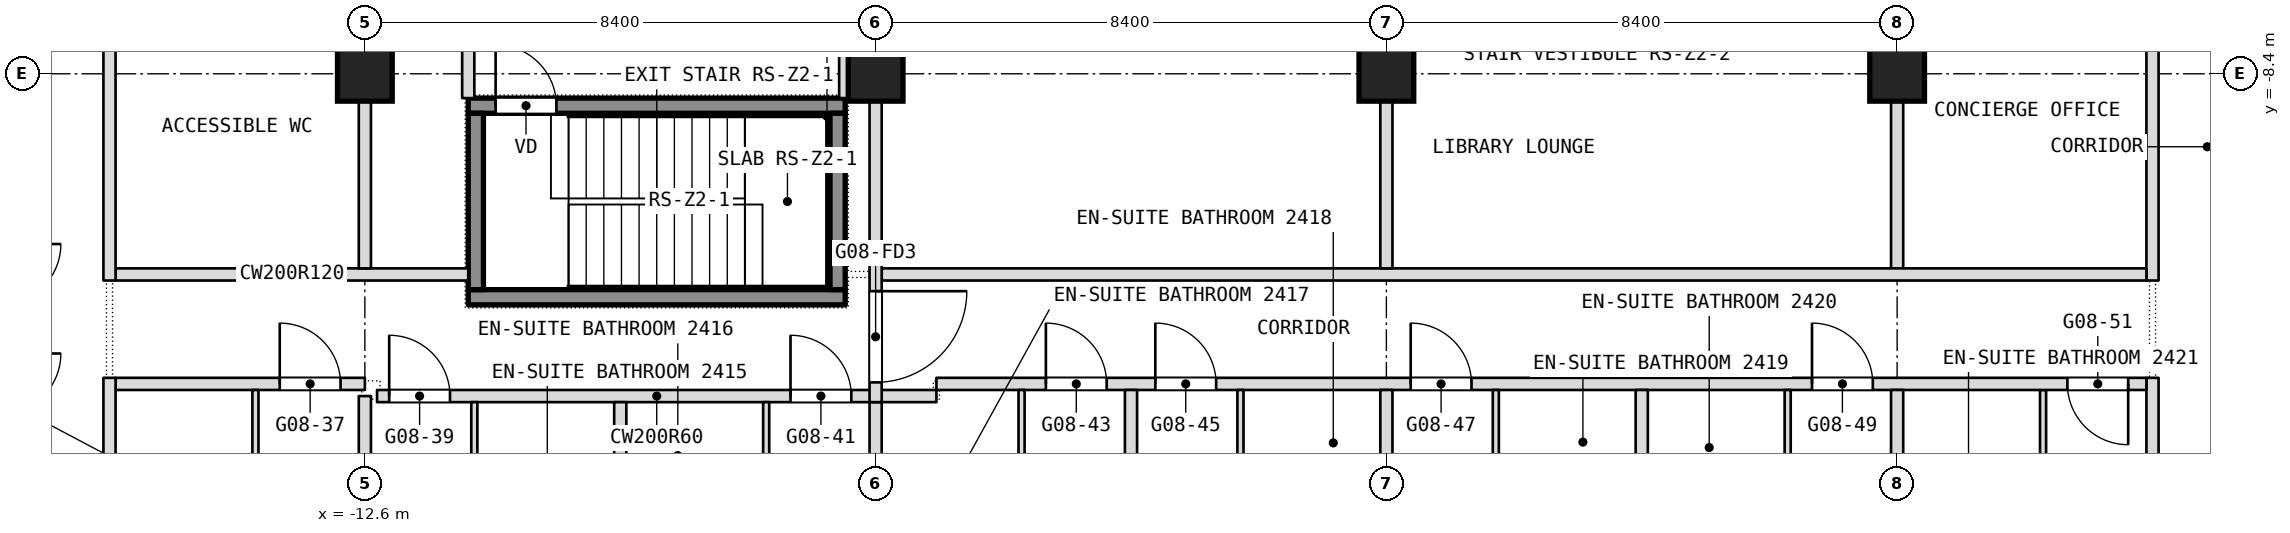
"""IFC4 building model, lengths in metres.
Left out: names, types, materials, properties, quantities, classifications, styles, units other than length and angle.
Written with IfcOpenShell. Run it as: python <this file> out.ifc"""

import sys

from ifc_helpers import new_model, si_unit, direction, frame, frame_2d, origin, origin_2d, place, context, subcontext, project, spatial, rectangle, extrude, element, fill, save


model = new_model("IFC4")
c1 = context("Model", 3, precision=1e-05, world=origin(), true_north=direction((0.0, 1.0)))
c2 = subcontext(c1, "Body", "Model", "MODEL_VIEW")
j1 = project(units=[si_unit("LENGTHUNIT", "METRE"), si_unit("PLANEANGLEUNIT", "RADIAN")], contexts=[c1])
p1 = place(None, origin())
s1 = spatial("IfcSite", under=j1, at=p1, CompositionType="ELEMENT")
p2 = place(p1, origin())
s2 = spatial("IfcBuilding", under=s1, at=p2, CompositionType="ELEMENT")
p3 = place(p2, frame((0.0, 0.0, 112.1)))
s3 = spatial("IfcBuildingStorey", under=s2, at=p3, CompositionType="ELEMENT", Elevation=112.1)
for number, where, z_axis, x_axis in (
    (1, (-12.6, -8.4, 0.0), (0.0, 0.0, 1.0), (1.0, 0.0, 0.0)),
    (2, (-4.2, -8.4, 0.0), (0.0, 0.0, 1.0), (1.0, 0.0, 0.0)),
    (3, (4.2, -8.4, 0.0), (0.0, 0.0, 1.0), (1.0, 0.0, 0.0)),
    (4, (12.6, -8.4, 0.0), (0.0, 0.0, 1.0), (1.0, 0.0, 0.0)),
):
    element("IfcColumn", number, at=place(p3, frame(where, z_axis=z_axis, x_axis=x_axis)), inside=s3, PredefinedType="COLUMN", context=c2, shape_type="SweptSolid", body=[
        extrude(rectangle(XDim=0.9, YDim=0.9, at=origin_2d()), origin(), (0.0, 0.0, 1.0), 3.6),
    ])
p4 = place(p3, frame((16.8, -22.186, 0.0), z_axis=(0.0, 0.0, 1.0), x_axis=(0.0, 1.0, 0.0)))
e5 = element("IfcWall", 5, at=p4, inside=s3, PredefinedType="PARTITIONING", context=c2, shape_type="SweptSolid", body=[
    extrude(rectangle(XDim=8.786, YDim=0.2, at=frame_2d((4.393, 0.0))), origin(), (0.0, 0.0, 1.0), 3.34),
])
p5 = place(p3, frame((16.8, -11.8, 0.0), z_axis=(0.0, 0.0, 1.0), x_axis=(0.0, 1.0, 0.0)))
e6 = element("IfcWall", 6, at=p5, inside=s3, PredefinedType="PARTITIONING", context=c2, shape_type="SweptSolid", body=[
    extrude(rectangle(XDim=9.9, YDim=0.2, at=frame_2d((4.95, 0.0))), origin(), (0.0, 0.0, 1.0), 3.34),
])
p6 = place(p3, frame((15.0, -16.85, 0.0), z_axis=(0.0, 0.0, 1.0), x_axis=(0.0, 1.0, 0.0)))
e7 = element("IfcWall", 7, at=p6, inside=s3, PredefinedType="PARTITIONING", context=c2, shape_type="SweptSolid", body=[
    extrude(rectangle(XDim=3.25, YDim=0.1, at=frame_2d((1.625, 0.0))), origin(), (0.0, 0.0, 1.0), 3.34),
])
p7 = place(p3, frame((-12.4, -13.7, 0.0), z_axis=(0.0, 0.0, 1.0), x_axis=(1.0, 0.0, 0.0)))
e8 = element("IfcWall", 8, at=p7, inside=s3, PredefinedType="PARTITIONING", context=c2, shape_type="SweptSolid", body=[
    extrude(rectangle(XDim=9.2, YDim=0.2, at=frame_2d((4.6, 0.0))), origin(), (0.0, 0.0, 1.0), 3.34),
])
p8 = place(p7, frame((0.2, 0.0, 0.0)))
e9 = element("IfcOpeningElement", 9, at=p8, cuts=e8, PredefinedType="OPENING", context=c2, shape_type="SweptSolid", body=[
    extrude(rectangle(XDim=1.0, YDim=2.1, at=frame_2d((0.5, 1.05))), frame((0.0, 0.1, 0.0), z_axis=(0.0, -1.0, 0.0), x_axis=(1.0, 0.0, 0.0)), (0.0, 0.0, 1.0), 0.2),
])
p9 = place(p7, frame((6.8, 0.0, 0.0)))
e10 = element("IfcOpeningElement", 10, at=p9, cuts=e8, PredefinedType="OPENING", context=c2, shape_type="SweptSolid", body=[
    extrude(rectangle(XDim=1.0, YDim=2.1, at=frame_2d((0.5, 1.05))), frame((0.0, 0.1, 0.0), z_axis=(0.0, -1.0, 0.0), x_axis=(1.0, 0.0, 0.0)), (0.0, 0.0, 1.0), 0.2),
])
p10 = place(p3, frame((-16.7, -13.5, 0.0), z_axis=(0.0, 0.0, 1.0), x_axis=(1.0, 0.0, 0.0)))
e11 = element("IfcWall", 11, at=p10, inside=s3, PredefinedType="PARTITIONING", context=c2, shape_type="SweptSolid", body=[
    extrude(rectangle(XDim=4.1, YDim=0.2, at=frame_2d((2.05, 0.0))), origin(), (0.0, 0.0, 1.0), 3.34),
])
p11 = place(p10, frame((2.7, 0.0, 0.0)))
e12 = element("IfcOpeningElement", 12, at=p11, cuts=e11, PredefinedType="OPENING", context=c2, shape_type="SweptSolid", body=[
    extrude(rectangle(XDim=1.0, YDim=2.1, at=frame_2d((0.5, 1.05))), frame((0.0, 0.1, 0.0), z_axis=(0.0, -1.0, 0.0), x_axis=(1.0, 0.0, 0.0)), (0.0, 0.0, 1.0), 0.2),
])
p12 = place(p3, frame((-3.2, -13.5, 0.0), z_axis=(0.0, 0.0, 1.0), x_axis=(1.0, 0.0, 0.0)))
e13 = element("IfcWall", 13, at=p12, inside=s3, PredefinedType="PARTITIONING", context=c2, shape_type="SweptSolid", body=[
    extrude(rectangle(XDim=19.9, YDim=0.2, at=frame_2d((9.95, 0.0))), origin(), (0.0, 0.0, 1.0), 3.34),
])
p13 = place(p12, frame((1.8, 0.0, 0.0)))
e14 = element("IfcOpeningElement", 14, at=p13, cuts=e13, PredefinedType="OPENING", context=c2, shape_type="SweptSolid", body=[
    extrude(rectangle(XDim=1.0, YDim=2.1, at=frame_2d((0.5, 1.05))), frame((0.0, 0.1, 0.0), z_axis=(0.0, -1.0, 0.0), x_axis=(1.0, 0.0, 0.0)), (0.0, 0.0, 1.0), 0.2),
])
p14 = place(p12, frame((3.6, 0.0, 0.0)))
e15 = element("IfcOpeningElement", 15, at=p14, cuts=e13, PredefinedType="OPENING", context=c2, shape_type="SweptSolid", body=[
    extrude(rectangle(XDim=1.0, YDim=2.1, at=frame_2d((0.5, 1.05))), frame((0.0, 0.1, 0.0), z_axis=(0.0, -1.0, 0.0), x_axis=(1.0, 0.0, 0.0)), (0.0, 0.0, 1.0), 0.2),
])
p15 = place(p12, frame((7.8, 0.0, 0.0)))
e16 = element("IfcOpeningElement", 16, at=p15, cuts=e13, PredefinedType="OPENING", context=c2, shape_type="SweptSolid", body=[
    extrude(rectangle(XDim=1.0, YDim=2.1, at=frame_2d((0.5, 1.05))), frame((0.0, 0.1, 0.0), z_axis=(0.0, -1.0, 0.0), x_axis=(1.0, 0.0, 0.0)), (0.0, 0.0, 1.0), 0.2),
])
p16 = place(p12, frame((14.4, 0.0, 0.0)))
e17 = element("IfcOpeningElement", 17, at=p16, cuts=e13, PredefinedType="OPENING", context=c2, shape_type="SweptSolid", body=[
    extrude(rectangle(XDim=1.0, YDim=2.1, at=frame_2d((0.5, 1.05))), frame((0.0, 0.1, 0.0), z_axis=(0.0, -1.0, 0.0), x_axis=(1.0, 0.0, 0.0)), (0.0, 0.0, 1.0), 0.2),
])
p17 = place(p12, frame((18.6, 0.0, 0.0)))
e18 = element("IfcOpeningElement", 18, at=p17, cuts=e13, PredefinedType="OPENING", context=c2, shape_type="SweptSolid", body=[
    extrude(rectangle(XDim=1.0, YDim=2.1, at=frame_2d((0.5, 1.05))), frame((0.0, 0.1, 0.0), z_axis=(0.0, -1.0, 0.0), x_axis=(1.0, 0.0, 0.0)), (0.0, 0.0, 1.0), 0.2),
])
p18 = place(p3, frame((12.6, -21.175, 0.0), z_axis=(0.0, 0.0, 1.0), x_axis=(0.0, 1.0, 0.0)))
e19 = element("IfcWall", 19, at=p18, inside=s3, PredefinedType="PARTITIONING", context=c2, shape_type="SweptSolid", body=[
    extrude(rectangle(XDim=7.575, YDim=0.2, at=frame_2d((3.788, 0.0))), origin(), (0.0, 0.0, 1.0), 3.34),
])
p19 = place(p3, frame((12.6, -11.6, 0.0), z_axis=(0.0, 0.0, 1.0), x_axis=(0.0, 1.0, 0.0)))
e20 = element("IfcWall", 20, at=p19, inside=s3, PredefinedType="PARTITIONING", context=c2, shape_type="SweptSolid", body=[
    extrude(rectangle(XDim=3.9, YDim=0.2, at=frame_2d((1.95, 0.0))), origin(), (0.0, 0.0, 1.0), 3.34),
])
p20 = place(p3, frame((-16.7, -11.7, 0.0), z_axis=(0.0, 0.0, 1.0), x_axis=(1.0, 0.0, 0.0)))
e21 = element("IfcWall", 21, at=p20, inside=s3, PredefinedType="PARTITIONING", context=c2, shape_type="SweptSolid", body=[
    extrude(rectangle(XDim=5.8, YDim=0.2, at=frame_2d((2.9, 0.0))), origin(), (0.0, 0.0, 1.0), 3.34),
])
p21 = place(p3, frame((-4.1, -11.7, 0.0), z_axis=(0.0, 0.0, 1.0), x_axis=(1.0, 0.0, 0.0)))
e22 = element("IfcWall", 22, at=p21, inside=s3, PredefinedType="PARTITIONING", context=c2, shape_type="SweptSolid", body=[
    extrude(rectangle(XDim=20.8, YDim=0.2, at=frame_2d((10.4, 0.0))), origin(), (0.0, 0.0, 1.0), 3.34),
])
p22 = place(p3, frame((10.8, -16.45, 0.0), z_axis=(0.0, 0.0, 1.0), x_axis=(0.0, 1.0, 0.0)))
e23 = element("IfcWall", 23, at=p22, inside=s3, PredefinedType="PARTITIONING", context=c2, shape_type="SweptSolid", body=[
    extrude(rectangle(XDim=2.85, YDim=0.1, at=frame_2d((1.425, 0.0))), origin(), (0.0, 0.0, 1.0), 3.34),
])
p23 = place(p3, frame((8.4, -23.3, 0.0), z_axis=(0.0, 0.0, 1.0), x_axis=(0.0, 1.0, 0.0)))
e24 = element("IfcWall", 24, at=p23, inside=s3, PredefinedType="PARTITIONING", context=c2, shape_type="SweptSolid", body=[
    extrude(rectangle(XDim=9.7, YDim=0.2, at=frame_2d((4.85, 0.0))), origin(), (0.0, 0.0, 1.0), 3.34),
])
p24 = place(p3, frame((6.0, -16.35, 0.0), z_axis=(0.0, 0.0, 1.0), x_axis=(0.0, 1.0, 0.0)))
e25 = element("IfcWall", 25, at=p24, inside=s3, PredefinedType="PARTITIONING", context=c2, shape_type="SweptSolid", body=[
    extrude(rectangle(XDim=2.75, YDim=0.1, at=frame_2d((1.375, 0.0))), origin(), (0.0, 0.0, 1.0), 3.34),
])
p25 = place(p3, frame((4.2, -23.3, 0.0), z_axis=(0.0, 0.0, 1.0), x_axis=(0.0, 1.0, 0.0)))
e26 = element("IfcWall", 26, at=p25, inside=s3, PredefinedType="PARTITIONING", context=c2, shape_type="SweptSolid", body=[
    extrude(rectangle(XDim=9.7, YDim=0.2, at=frame_2d((4.85, 0.0))), origin(), (0.0, 0.0, 1.0), 3.34),
])
p26 = place(p3, frame((4.2, -11.6, 0.0), z_axis=(0.0, 0.0, 1.0), x_axis=(0.0, 1.0, 0.0)))
e27 = element("IfcWall", 27, at=p26, inside=s3, PredefinedType="PARTITIONING", context=c2, shape_type="SweptSolid", body=[
    extrude(rectangle(XDim=9.7, YDim=0.2, at=frame_2d((4.85, 0.0))), origin(), (0.0, 0.0, 1.0), 3.34),
])
p27 = place(p3, frame((1.8, -17.45, 0.0), z_axis=(0.0, 0.0, 1.0), x_axis=(0.0, 1.0, 0.0)))
e28 = element("IfcWall", 28, at=p27, inside=s3, PredefinedType="PARTITIONING", context=c2, shape_type="SweptSolid", body=[
    extrude(rectangle(XDim=3.85, YDim=0.1, at=frame_2d((1.925, 0.0))), origin(), (0.0, 0.0, 1.0), 3.34),
])
p28 = place(p27, frame((1.355, 0.0, 0.0)))
e29 = element("IfcOpeningElement", 29, at=p28, cuts=e28, PredefinedType="OPENING", context=c2, shape_type="SweptSolid", body=[
    extrude(rectangle(XDim=0.9, YDim=2.1, at=frame_2d((0.45, 1.05))), frame((0.0, 0.05, 0.0), z_axis=(0.0, -1.0, 0.0), x_axis=(1.0, 0.0, 0.0)), (0.0, 0.0, 1.0), 0.1),
])
p29 = place(p3, frame((0.0, -23.3, 0.0), z_axis=(0.0, 0.0, 1.0), x_axis=(0.0, 1.0, 0.0)))
e30 = element("IfcWall", 30, at=p29, inside=s3, PredefinedType="PARTITIONING", context=c2, shape_type="SweptSolid", body=[
    extrude(rectangle(XDim=9.7, YDim=0.2, at=frame_2d((4.85, 0.0))), origin(), (0.0, 0.0, 1.0), 3.34),
])
p30 = place(p3, frame((-1.8, -17.35, 0.0), z_axis=(0.0, 0.0, 1.0), x_axis=(0.0, 1.0, 0.0)))
e31 = element("IfcWall", 31, at=p30, inside=s3, PredefinedType="PARTITIONING", context=c2, shape_type="SweptSolid", body=[
    extrude(rectangle(XDim=3.75, YDim=0.1, at=frame_2d((1.875, 0.0))), origin(), (0.0, 0.0, 1.0), 3.34),
])
p31 = place(p3, frame((-4.2, -23.3, 0.0), z_axis=(0.0, 0.0, 1.0), x_axis=(0.0, 1.0, 0.0)))
e32 = element("IfcWall", 32, at=p31, inside=s3, PredefinedType="PARTITIONING", context=c2, shape_type="SweptSolid", body=[
    extrude(rectangle(XDim=9.5, YDim=0.2, at=frame_2d((4.75, 0.0))), origin(), (0.0, 0.0, 1.0), 3.34),
])
p32 = place(p3, frame((-4.2, -13.8, 0.0), z_axis=(0.0, 0.0, 1.0), x_axis=(0.0, 1.0, 0.0)))
e33 = element("IfcWall", 33, at=p32, inside=s3, PredefinedType="PARTITIONING", context=c2, shape_type="SweptSolid", body=[
    extrude(rectangle(XDim=13.8, YDim=0.2, at=frame_2d((6.9, 0.0))), origin(), (0.0, 0.0, 1.0), 3.34),
])
p33 = place(p32, frame((12.15, 0.0, 0.0)))
e34 = element("IfcOpeningElement", 34, at=p33, cuts=e33, PredefinedType="OPENING", context=c2, shape_type="SweptSolid", body=[
    extrude(rectangle(XDim=1.5, YDim=2.1, at=frame_2d((0.75, 1.05))), frame((0.0, 0.1, 0.0), z_axis=(0.0, -1.0, 0.0), x_axis=(1.0, 0.0, 0.0)), (0.0, 0.0, 1.0), 0.2),
])
p34 = place(p32, frame((0.325, 0.0, 0.0)))
e35 = element("IfcOpeningElement", 35, at=p34, cuts=e33, PredefinedType="OPENING", context=c2, shape_type="SweptSolid", body=[
    extrude(rectangle(XDim=1.5, YDim=2.1, at=frame_2d((0.75, 1.05))), frame((0.0, 0.1, 0.0), z_axis=(0.0, -1.0, 0.0), x_axis=(1.0, 0.0, 0.0)), (0.0, 0.0, 1.0), 0.2),
])
p35 = place(p3, frame((-4.7, -8.8, 0.0), z_axis=(0.0, 0.0, 1.0), x_axis=(0.0, 1.0, 0.0)))
e36 = element("IfcWall", 36, at=p35, inside=s3, PredefinedType="PARTITIONING", context=c2, shape_type="SweptSolid", body=[
    extrude(rectangle(XDim=1.7, YDim=0.2, at=frame_2d((0.85, 0.0))), origin(), (0.0, 0.0, 1.0), 3.34),
])
p36 = place(p3, frame((-6.0, -16.45, 0.0), z_axis=(0.0, 0.0, 1.0), x_axis=(0.0, 1.0, 0.0)))
e37 = element("IfcWall", 37, at=p36, inside=s3, PredefinedType="PARTITIONING", context=c2, shape_type="SweptSolid", body=[
    extrude(rectangle(XDim=2.65, YDim=0.1, at=frame_2d((1.325, 0.0))), origin(), (0.0, 0.0, 1.0), 3.34),
])
p37 = place(p3, frame((-8.4, -23.3, 0.0), z_axis=(0.0, 0.0, 1.0), x_axis=(0.0, 1.0, 0.0)))
e38 = element("IfcWall", 38, at=p37, inside=s3, PredefinedType="PARTITIONING", context=c2, shape_type="SweptSolid", body=[
    extrude(rectangle(XDim=9.5, YDim=0.2, at=frame_2d((4.75, 0.0))), origin(), (0.0, 0.0, 1.0), 3.34),
])
p38 = place(p3, frame((-10.8, -17.65, 0.0), z_axis=(0.0, 0.0, 1.0), x_axis=(0.0, 1.0, 0.0)))
e39 = element("IfcWall", 39, at=p38, inside=s3, PredefinedType="PARTITIONING", context=c2, shape_type="SweptSolid", body=[
    extrude(rectangle(XDim=3.85, YDim=0.1, at=frame_2d((1.925, 0.0))), origin(), (0.0, 0.0, 1.0), 3.34),
])
p39 = place(p3, frame((-10.9, -8.8, 0.0), z_axis=(0.0, 0.0, 1.0), x_axis=(0.0, 1.0, 0.0)))
e40 = element("IfcWall", 40, at=p39, inside=s3, PredefinedType="PARTITIONING", context=c2, shape_type="SweptSolid", body=[
    extrude(rectangle(XDim=1.5, YDim=0.2, at=frame_2d((0.75, 0.0))), origin(), (0.0, 0.0, 1.0), 3.34),
])
p40 = place(p3, frame((-12.6, -21.175, 0.0), z_axis=(0.0, 0.0, 1.0), x_axis=(0.0, 1.0, 0.0)))
e41 = element("IfcWall", 41, at=p40, inside=s3, PredefinedType="PARTITIONING", context=c2, shape_type="SweptSolid", body=[
    extrude(rectangle(XDim=7.475, YDim=0.2, at=frame_2d((3.738, 0.0))), origin(), (0.0, 0.0, 1.0), 3.34),
])
p41 = place(p3, frame((-12.6, -11.6, 0.0), z_axis=(0.0, 0.0, 1.0), x_axis=(0.0, 1.0, 0.0)))
e42 = element("IfcWall", 42, at=p41, inside=s3, PredefinedType="PARTITIONING", context=c2, shape_type="SweptSolid", body=[
    extrude(rectangle(XDim=9.7, YDim=0.2, at=frame_2d((4.85, 0.0))), origin(), (0.0, 0.0, 1.0), 3.34),
])
p42 = place(p3, frame((-14.4, -17.65, 0.0), z_axis=(0.0, 0.0, 1.0), x_axis=(0.0, 1.0, 0.0)))
e43 = element("IfcWall", 43, at=p42, inside=s3, PredefinedType="PARTITIONING", context=c2, shape_type="SweptSolid", body=[
    extrude(rectangle(XDim=4.05, YDim=0.1, at=frame_2d((2.025, 0.0))), origin(), (0.0, 0.0, 1.0), 3.34),
])
p43 = place(p3, frame((-16.8, -22.186, 0.0), z_axis=(0.0, 0.0, 1.0), x_axis=(0.0, 1.0, 0.0)))
e44 = element("IfcWall", 44, at=p43, inside=s3, PredefinedType="PARTITIONING", context=c2, shape_type="SweptSolid", body=[
    extrude(rectangle(XDim=8.786, YDim=0.2, at=frame_2d((4.393, 0.0))), origin(), (0.0, 0.0, 1.0), 3.34),
])
p44 = place(p3, frame((-16.8, -11.8, 0.0), z_axis=(0.0, 0.0, 1.0), x_axis=(0.0, 1.0, 0.0)))
e45 = element("IfcWall", 45, at=p44, inside=s3, PredefinedType="PARTITIONING", context=c2, shape_type="SweptSolid", body=[
    extrude(rectangle(XDim=9.9, YDim=0.2, at=frame_2d((4.95, 0.0))), origin(), (0.0, 0.0, 1.0), 3.34),
])
p45 = place(p3, frame((-10.9, -12.075, 0.1), z_axis=(0.0, 0.0, 1.0), x_axis=(1.0, 0.0, 0.0)))
e46 = element("IfcWall", 46, at=p45, inside=s3, PredefinedType="SHEAR", context=c2, shape_type="SweptSolid", body=[
    extrude(rectangle(XDim=6.2, YDim=0.25, at=frame_2d((3.1, 0.0))), origin(), (0.0, 0.0, 1.0), 3.6),
])
p46 = place(p3, frame((-10.9, -8.925, 0.1), z_axis=(0.0, 0.0, 1.0), x_axis=(1.0, 0.0, 0.0)))
e47 = element("IfcWall", 47, at=p46, inside=s3, PredefinedType="SHEAR", context=c2, shape_type="SweptSolid", body=[
    extrude(rectangle(XDim=6.2, YDim=0.25, at=frame_2d((3.1, 0.0))), origin(), (0.0, 0.0, 1.0), 3.6),
])
p47 = place(p46, frame((0.45, 0.0, 0.0)))
e48 = element("IfcOpeningElement", 48, at=p47, cuts=e47, PredefinedType="OPENING", context=c2, shape_type="SweptSolid", body=[
    extrude(rectangle(XDim=1.0, YDim=2.1, at=frame_2d((0.5, 1.05))), frame((0.0, 0.125, 0.0), z_axis=(0.0, -1.0, 0.0), x_axis=(1.0, 0.0, 0.0)), (0.0, 0.0, 1.0), 0.25),
])
for number, where, z_axis, x_axis in (
    (49, (-10.775, -11.95, 0.1), (0.0, 0.0, 1.0), (0.0, 1.0, 0.0)),
    (50, (-4.825, -11.95, 0.1), (0.0, 0.0, 1.0), (0.0, 1.0, 0.0)),
):
    element("IfcWall", number, at=place(p3, frame(where, z_axis=z_axis, x_axis=x_axis)), inside=s3, PredefinedType="SHEAR", context=c2, shape_type="SweptSolid", body=[
        extrude(rectangle(XDim=2.9, YDim=0.25, at=frame_2d((1.45, 0.0))), origin(), (0.0, 0.0, 1.0), 3.6),
    ])
p48 = place(p8, origin())
e51 = element("IfcDoor", 51, at=p48, inside=s3, OperationType="SINGLE_SWING_RIGHT", PredefinedType="DOOR", context=c2, shape_type="SweptSolid", body=[
    extrude(rectangle(XDim=1.0, YDim=2.1, at=frame_2d((0.5, 1.05))), frame((0.0, 0.025, 0.0), z_axis=(0.0, -1.0, 0.0), x_axis=(1.0, 0.0, 0.0)), (0.0, 0.0, 1.0), 0.05),
])
fill(e9, e51)
p49 = place(p9, origin())
e52 = element("IfcDoor", 52, at=p49, inside=s3, OperationType="SINGLE_SWING_LEFT", PredefinedType="DOOR", context=c2, shape_type="SweptSolid", body=[
    extrude(rectangle(XDim=1.0, YDim=2.1, at=frame_2d((0.5, 1.05))), frame((0.0, 0.025, 0.0), z_axis=(0.0, -1.0, 0.0), x_axis=(1.0, 0.0, 0.0)), (0.0, 0.0, 1.0), 0.05),
])
fill(e10, e52)
p50 = place(p11, origin())
e53 = element("IfcDoor", 53, at=p50, inside=s3, OperationType="SINGLE_SWING_LEFT", PredefinedType="DOOR", context=c2, shape_type="SweptSolid", body=[
    extrude(rectangle(XDim=1.0, YDim=2.1, at=frame_2d((0.5, 1.05))), frame((0.0, 0.025, 0.0), z_axis=(0.0, -1.0, 0.0), x_axis=(1.0, 0.0, 0.0)), (0.0, 0.0, 1.0), 0.05),
])
fill(e12, e53)
p51 = place(p13, origin())
e54 = element("IfcDoor", 54, at=p51, inside=s3, OperationType="SINGLE_SWING_LEFT", PredefinedType="DOOR", context=c2, shape_type="SweptSolid", body=[
    extrude(rectangle(XDim=1.0, YDim=2.1, at=frame_2d((0.5, 1.05))), frame((0.0, 0.025, 0.0), z_axis=(0.0, -1.0, 0.0), x_axis=(1.0, 0.0, 0.0)), (0.0, 0.0, 1.0), 0.05),
])
fill(e14, e54)
p52 = place(p14, origin())
e55 = element("IfcDoor", 55, at=p52, inside=s3, OperationType="SINGLE_SWING_LEFT", PredefinedType="DOOR", context=c2, shape_type="SweptSolid", body=[
    extrude(rectangle(XDim=1.0, YDim=2.1, at=frame_2d((0.5, 1.05))), frame((0.0, 0.025, 0.0), z_axis=(0.0, -1.0, 0.0), x_axis=(1.0, 0.0, 0.0)), (0.0, 0.0, 1.0), 0.05),
])
fill(e15, e55)
p53 = place(p15, origin())
e56 = element("IfcDoor", 56, at=p53, inside=s3, OperationType="SINGLE_SWING_LEFT", PredefinedType="DOOR", context=c2, shape_type="SweptSolid", body=[
    extrude(rectangle(XDim=1.0, YDim=2.1, at=frame_2d((0.5, 1.05))), frame((0.0, 0.025, 0.0), z_axis=(0.0, -1.0, 0.0), x_axis=(1.0, 0.0, 0.0)), (0.0, 0.0, 1.0), 0.05),
])
fill(e16, e56)
p54 = place(p16, origin())
e57 = element("IfcDoor", 57, at=p54, inside=s3, OperationType="SINGLE_SWING_LEFT", PredefinedType="DOOR", context=c2, shape_type="SweptSolid", body=[
    extrude(rectangle(XDim=1.0, YDim=2.1, at=frame_2d((0.5, 1.05))), frame((0.0, 0.025, 0.0), z_axis=(0.0, -1.0, 0.0), x_axis=(1.0, 0.0, 0.0)), (0.0, 0.0, 1.0), 0.05),
])
fill(e17, e57)
p55 = place(p17, origin())
e58 = element("IfcDoor", 58, at=p55, inside=s3, OperationType="SINGLE_SWING_LEFT", PredefinedType="DOOR", context=c2, shape_type="SweptSolid", body=[
    extrude(rectangle(XDim=1.0, YDim=2.1, at=frame_2d((0.5, 1.05))), frame((0.0, 0.025, 0.0), z_axis=(0.0, -1.0, 0.0), x_axis=(1.0, 0.0, 0.0)), (0.0, 0.0, 1.0), 0.05),
])
fill(e18, e58)
p56 = place(p47, origin())
e59 = element("IfcDoor", 59, at=p56, inside=s3, OperationType="SINGLE_SWING_LEFT", PredefinedType="DOOR", context=c2, shape_type="SweptSolid", body=[
    extrude(rectangle(XDim=1.0, YDim=2.1, at=frame_2d((0.5, 1.05))), frame((0.0, 0.025, 0.0), z_axis=(0.0, -1.0, 0.0), x_axis=(1.0, 0.0, 0.0)), (0.0, 0.0, 1.0), 0.05),
])
fill(e48, e59)
p57 = place(p34, origin())
e60 = element("IfcDoor", 60, at=p57, inside=s3, OperationType="DOUBLE_DOOR_DOUBLE_SWING", PredefinedType="DOOR", context=c2, shape_type="SweptSolid", body=[
    extrude(rectangle(XDim=1.5, YDim=2.1, at=frame_2d((0.75, 1.05))), frame((0.0, 0.025, 0.0), z_axis=(0.0, -1.0, 0.0), x_axis=(1.0, 0.0, 0.0)), (0.0, 0.0, 1.0), 0.05),
])
fill(e35, e60)
save(model, sys.argv[1])
